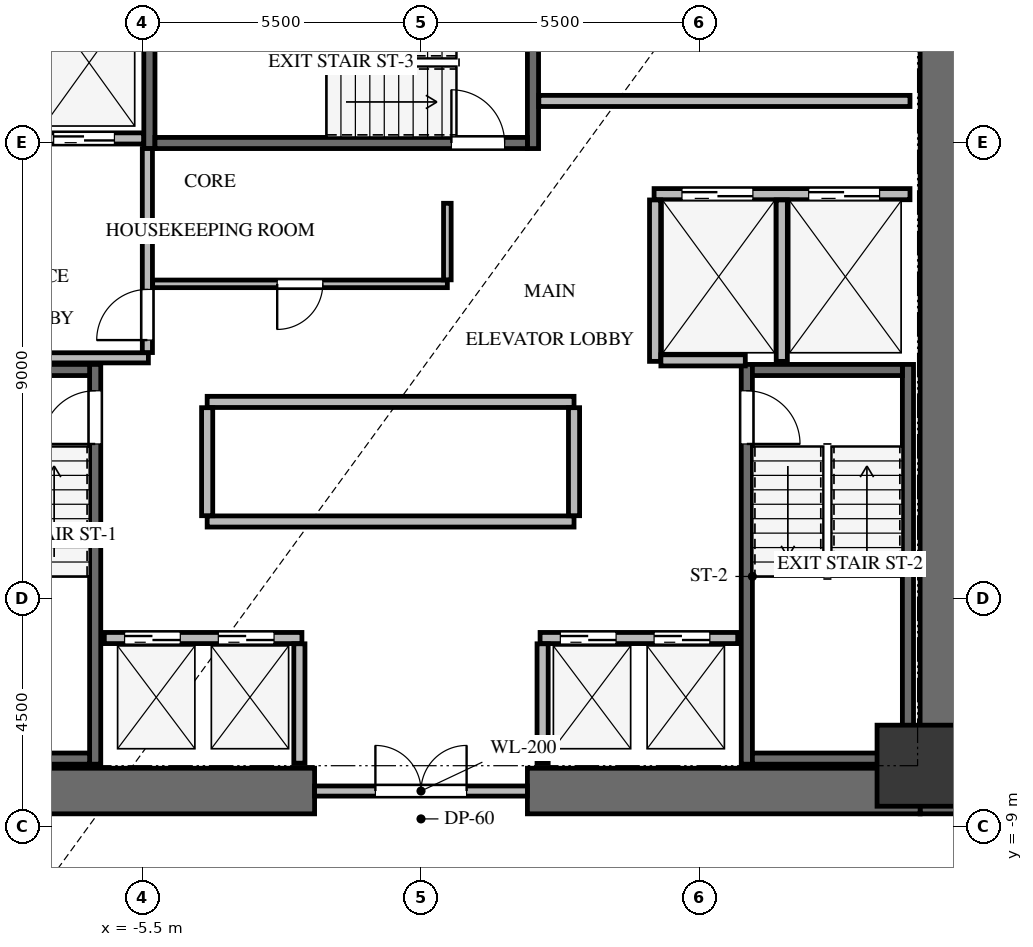
"""IFC4 building model, lengths in metres.
Left out: names, types, materials, properties, quantities, classifications, styles, units other than length and angle.
Written with IfcOpenShell. Run it as: python <this file> out.ifc"""

import sys

from ifc_helpers import new_model, si_unit, direction, frame, frame_2d, origin, origin_2d, place, context, subcontext, project, spatial, rectangle, extrude, source, transform, mapped, element, fill, save


model = new_model("IFC4")
c1 = context("Model", 3, precision=1e-05, world=origin(), true_north=direction((0.0, 1.0)))
c2 = subcontext(c1, "Body", "Model", "MODEL_VIEW")
j1 = project(units=[si_unit("LENGTHUNIT", "METRE"), si_unit("PLANEANGLEUNIT", "RADIAN")], contexts=[c1])
p1 = place(None, origin())
s1 = spatial("IfcSite", under=j1, at=p1, CompositionType="ELEMENT")
p2 = place(p1, origin())
s2 = spatial("IfcBuilding", under=s1, at=p2, CompositionType="ELEMENT")
p3 = place(p2, frame((0.0, 0.0, 32.4)))
s3 = spatial("IfcBuildingStorey", under=s2, at=p3, CompositionType="ELEMENT", Elevation=32.4)
p4 = place(p3, frame((10.3, -8.75, 0.0), z_axis=(0.0, 0.0, 1.0), x_axis=(0.0, 1.0, 0.0)))
e1 = element("IfcWall", 1, at=p4, inside=s3, PredefinedType="SHEAR", context=c2, shape_type="SweptSolid", body=[
    extrude(rectangle(XDim=17.5, YDim=0.9, at=frame_2d((8.75, 0.0))), origin(), (0.0, 0.0, 1.0), 3.3),
])
for number, where, z_axis, x_axis in (
    (2, (-9.85, -8.3, 0.0), (0.0, 0.0, 1.0), (1.0, 0.0, 0.0)),
    (3, (2.1, -8.3, 0.0), (0.0, 0.0, 1.0), (1.0, 0.0, 0.0)),
):
    element("IfcWall", number, at=place(p3, frame(where, z_axis=z_axis, x_axis=x_axis)), inside=s3, PredefinedType="SHEAR", context=c2, shape_type="SweptSolid", body=[
        extrude(rectangle(XDim=7.75, YDim=0.9, at=frame_2d((3.875, 0.0))), origin(), (0.0, 0.0, 1.0), 3.3),
    ])
p5 = place(p3, frame((-6.43, -7.77, -0.24), z_axis=(0.0, 0.0, 1.0), x_axis=(0.0, 1.0, 0.0)))
e4 = element("IfcWall", 4, at=p5, inside=s3, PredefinedType="SHEAR", context=c2, shape_type="SweptSolid", body=[
    extrude(rectangle(XDim=7.89, YDim=0.22, at=frame_2d((3.945, 0.0))), origin(), (0.0, 0.0, 1.0), 3.3),
])
p6 = place(p5, frame((6.32, 0.0, 0.0)))
e5 = element("IfcOpeningElement", 5, at=p6, cuts=e4, PredefinedType="OPENING", context=c2, shape_type="SweptSolid", body=[
    extrude(rectangle(XDim=1.05, YDim=2.15, at=frame_2d((0.525, 1.075))), frame((0.0, 0.12, 0.0), z_axis=(0.0, -1.0, 0.0), x_axis=(1.0, 0.0, 0.0)), (0.0, 0.0, 1.0), 0.24),
])
for number, where, z_axis, x_axis in (
    (6, (-9.5, -7.66, -0.24), (0.0, 0.0, 1.0), (1.0, 0.0, 0.0)),
    (7, (-6.54, 0.01, -0.24), (0.0, 0.0, 1.0), (-1.0, 0.0, 0.0)),
):
    element("IfcWall", number, at=place(p3, frame(where, z_axis=z_axis, x_axis=x_axis)), inside=s3, PredefinedType="SHEAR", context=c2, shape_type="SweptSolid", body=[
        extrude(rectangle(XDim=2.96, YDim=0.22, at=frame_2d((1.48, 0.0))), origin(), (0.0, 0.0, 1.0), 3.3),
    ])
p7 = place(p3, frame((9.61, -7.77, -0.24), z_axis=(0.0, 0.0, 1.0), x_axis=(0.0, 1.0, 0.0)))
e8 = element("IfcWall", 8, at=p7, inside=s3, PredefinedType="SHEAR", context=c2, shape_type="SweptSolid", body=[
    extrude(rectangle(XDim=7.89, YDim=0.22, at=frame_2d((3.945, 0.0))), origin(), (0.0, 0.0, 1.0), 3.3),
])
p8 = place(p3, frame((6.43, 0.12, -0.24), z_axis=(0.0, 0.0, 1.0), x_axis=(0.0, -1.0, 0.0)))
e9 = element("IfcWall", 9, at=p8, inside=s3, PredefinedType="SHEAR", context=c2, shape_type="SweptSolid", body=[
    extrude(rectangle(XDim=7.89, YDim=0.22, at=frame_2d((3.945, 0.0))), origin(), (0.0, 0.0, 1.0), 3.3),
])
p9 = place(p8, frame((0.52, 0.0, 0.0)))
e10 = element("IfcOpeningElement", 10, at=p9, cuts=e9, PredefinedType="OPENING", context=c2, shape_type="SweptSolid", body=[
    extrude(rectangle(XDim=1.05, YDim=2.15, at=frame_2d((0.525, 1.075))), frame((0.0, 0.12, 0.0), z_axis=(0.0, -1.0, 0.0), x_axis=(1.0, 0.0, 0.0)), (0.0, 0.0, 1.0), 0.24),
])
for number, where, z_axis, x_axis in (
    (11, (6.54, -7.66, -0.24), (0.0, 0.0, 1.0), (1.0, 0.0, 0.0)),
    (12, (9.5, 0.01, -0.24), (0.0, 0.0, 1.0), (-1.0, 0.0, 0.0)),
):
    element("IfcWall", number, at=place(p3, frame(where, z_axis=z_axis, x_axis=x_axis)), inside=s3, PredefinedType="SHEAR", context=c2, shape_type="SweptSolid", body=[
        extrude(rectangle(XDim=2.96, YDim=0.22, at=frame_2d((1.48, 0.0))), origin(), (0.0, 0.0, 1.0), 3.3),
    ])
for number, where, z_axis, x_axis in (
    (13, (2.21, 4.38, -0.24), (0.0, 0.0, 1.0), (0.0, 1.0, 0.0)),
    (14, (-5.36, 7.78, -0.24), (0.0, 0.0, 1.0), (0.0, -1.0, 0.0)),
):
    element("IfcWall", number, at=place(p3, frame(where, z_axis=z_axis, x_axis=x_axis)), inside=s3, PredefinedType="SHEAR", context=c2, shape_type="SweptSolid", body=[
        extrude(rectangle(XDim=3.4, YDim=0.22, at=frame_2d((1.7, 0.0))), origin(), (0.0, 0.0, 1.0), 3.3),
    ])
p10 = place(p3, frame((-5.25, 4.49, -0.24), z_axis=(0.0, 0.0, 1.0), x_axis=(1.0, 0.0, 0.0)))
e15 = element("IfcWall", 15, at=p10, inside=s3, PredefinedType="SHEAR", context=c2, shape_type="SweptSolid", body=[
    extrude(rectangle(XDim=7.35, YDim=0.22, at=frame_2d((3.675, 0.0))), origin(), (0.0, 0.0, 1.0), 3.3),
])
p11 = place(p10, frame((5.85, 0.0, 0.0)))
e16 = element("IfcOpeningElement", 16, at=p11, cuts=e15, PredefinedType="OPENING", context=c2, shape_type="SweptSolid", body=[
    extrude(rectangle(XDim=1.05, YDim=2.15, at=frame_2d((0.525, 1.075))), frame((0.0, 0.12, 0.0), z_axis=(0.0, -1.0, 0.0), x_axis=(1.0, 0.0, 0.0)), (0.0, 0.0, 1.0), 0.24),
])
m1 = source(origin(), c2, "Body", "SweptSolid", [
    extrude(rectangle(XDim=1.6, YDim=1.6, at=origin_2d()), origin(), (0.0, 0.0, 1.0), 3.3),
])
p12 = place(p3, frame((9.8, -7.8, -0.24), z_axis=(0.0, 0.0, 1.0), x_axis=(1.0, 0.0, 0.0)))
e17 = element("IfcColumn", 17, at=p12, inside=s3, PredefinedType="COLUMN", context=c2, shape_type="MappedRepresentation", body=[
    mapped(m1, transform((0.0, 0.0, 0.0), x_axis=(1.0, 0.0, 0.0), y_axis=(0.0, 1.0, 0.0), z_axis=(0.0, 0.0, 1.0), scale=1.0)),
])
p13 = place(p3, frame((-2.1, -8.3, 0.0), z_axis=(0.0, 0.0, 1.0), x_axis=(1.0, 0.0, 0.0)))
e18 = element("IfcWall", 18, at=p13, inside=s3, PredefinedType="SOLIDWALL", context=c2, shape_type="SweptSolid", body=[
    extrude(rectangle(XDim=4.2, YDim=0.2, at=frame_2d((2.1, 0.0))), origin(), (0.0, 0.0, 1.0), 3.045),
])
p14 = place(p13, frame((1.2, 0.0, 0.0)))
e19 = element("IfcOpeningElement", 19, at=p14, cuts=e18, PredefinedType="OPENING", context=c2, shape_type="SweptSolid", body=[
    extrude(rectangle(XDim=1.8, YDim=2.15, at=frame_2d((0.9, 1.075))), frame((0.0, 0.11, 0.0), z_axis=(0.0, -1.0, 0.0), x_axis=(1.0, 0.0, 0.0)), (0.0, 0.0, 1.0), 0.22),
])
p15 = place(p3, frame((-9.65, 4.58, 0.0), z_axis=(0.0, 0.0, 1.0), x_axis=(1.0, 0.0, 0.0)))
e20 = element("IfcWall", 20, at=p15, inside=s3, PredefinedType="SOLIDWALL", context=c2, shape_type="SweptSolid", body=[
    extrude(rectangle(XDim=4.175, YDim=0.22, at=frame_2d((2.087, 0.0))), origin(), (0.0, 0.0, 1.0), 3.045),
])
p16 = place(p15, frame((0.4, 0.0, 0.0)))
e21 = element("IfcOpeningElement", 21, at=p16, cuts=e20, PredefinedType="OPENING", context=c2, shape_type="SweptSolid", body=[
    extrude(rectangle(XDim=1.2, YDim=2.15, at=frame_2d((0.6, 1.075))), frame((0.0, 0.12, 0.0), z_axis=(0.0, -1.0, 0.0), x_axis=(1.0, 0.0, 0.0)), (0.0, 0.0, 1.0), 0.24),
])
p17 = place(p15, frame((2.4, 0.0, 0.0)))
e22 = element("IfcOpeningElement", 22, at=p17, cuts=e20, PredefinedType="OPENING", context=c2, shape_type="SweptSolid", body=[
    extrude(rectangle(XDim=1.2, YDim=2.15, at=frame_2d((0.6, 1.075))), frame((0.0, 0.12, 0.0), z_axis=(0.0, -1.0, 0.0), x_axis=(1.0, 0.0, 0.0)), (0.0, 0.0, 1.0), 0.24),
])
p18 = place(p3, frame((-9.65, 0.25, 0.0), z_axis=(0.0, 0.0, 1.0), x_axis=(1.0, 0.0, 0.0)))
e23 = element("IfcWall", 23, at=p18, inside=s3, PredefinedType="SOLIDWALL", context=c2, shape_type="SweptSolid", body=[
    extrude(rectangle(XDim=4.27, YDim=0.2, at=frame_2d((2.135, 0.0))), origin(), (0.0, 0.0, 1.0), 3.045),
])
p19 = place(p3, frame((-5.4, 0.354, 0.0), z_axis=(0.0, 0.0, 1.0), x_axis=(0.0, 1.0, 0.0)))
e24 = element("IfcWall", 24, at=p19, inside=s3, PredefinedType="SOLIDWALL", context=c2, shape_type="SweptSolid", body=[
    extrude(rectangle(XDim=4.026, YDim=0.2, at=frame_2d((2.013, 0.0))), origin(), (0.0, 0.0, 1.0), 3.045),
])
p20 = place(p19, frame((0.246, 0.0, 0.0)))
e25 = element("IfcOpeningElement", 25, at=p20, cuts=e24, PredefinedType="OPENING", context=c2, shape_type="SweptSolid", body=[
    extrude(rectangle(XDim=1.0, YDim=2.15, at=frame_2d((0.5, 1.075))), frame((0.0, 0.11, 0.0), z_axis=(0.0, -1.0, 0.0), x_axis=(1.0, 0.0, 0.0)), (0.0, 0.0, 1.0), 0.22),
])
p21 = place(p3, frame((4.6, 3.48, 0.0), z_axis=(0.0, 0.0, 1.0), x_axis=(1.0, 0.0, 0.0)))
e26 = element("IfcWall", 26, at=p21, inside=s3, PredefinedType="SOLIDWALL", context=c2, shape_type="SweptSolid", body=[
    extrude(rectangle(XDim=5.05, YDim=0.22, at=frame_2d((2.525, 0.0))), origin(), (0.0, 0.0, 1.0), 3.045),
])
p22 = place(p21, frame((0.55, 0.0, 0.0)))
e27 = element("IfcOpeningElement", 27, at=p22, cuts=e26, PredefinedType="OPENING", context=c2, shape_type="SweptSolid", body=[
    extrude(rectangle(XDim=1.4, YDim=2.15, at=frame_2d((0.7, 1.075))), frame((0.0, 0.12, 0.0), z_axis=(0.0, -1.0, 0.0), x_axis=(1.0, 0.0, 0.0)), (0.0, 0.0, 1.0), 0.24),
])
p23 = place(p21, frame((3.05, 0.0, 0.0)))
e28 = element("IfcOpeningElement", 28, at=p23, cuts=e26, PredefinedType="OPENING", context=c2, shape_type="SweptSolid", body=[
    extrude(rectangle(XDim=1.4, YDim=2.15, at=frame_2d((0.7, 1.075))), frame((0.0, 0.12, 0.0), z_axis=(0.0, -1.0, 0.0), x_axis=(1.0, 0.0, 0.0)), (0.0, 0.0, 1.0), 0.24),
])
for number, where, z_axis, x_axis in (
    (29, (4.62, 0.18, 0.0), (0.0, 0.0, 1.0), (0.0, 1.0, 0.0)),
    (30, (7.12, 0.18, 0.0), (0.0, 0.0, 1.0), (0.0, 1.0, 0.0)),
):
    element("IfcWall", number, at=place(p3, frame(where, z_axis=z_axis, x_axis=x_axis)), inside=s3, PredefinedType="SOLIDWALL", context=c2, shape_type="SweptSolid", body=[
        extrude(rectangle(XDim=3.186, YDim=0.22, at=frame_2d((1.593, 0.0))), origin(), (0.0, 0.0, 1.0), 3.045),
    ])
p24 = place(p3, frame((4.734, 0.2, 0.0), z_axis=(0.0, 0.0, 1.0), x_axis=(1.0, 0.0, 0.0)))
e31 = element("IfcWall", 31, at=p24, inside=s3, PredefinedType="SOLIDWALL", context=c2, shape_type="SweptSolid", body=[
    extrude(rectangle(XDim=1.666, YDim=0.22, at=frame_2d((0.833, 0.0))), origin(), (0.0, 0.0, 1.0), 3.045),
])
p25 = place(p3, frame((-6.25, -5.28, 0.0), z_axis=(0.0, 0.0, 1.0), x_axis=(1.0, 0.0, 0.0)))
e32 = element("IfcWall", 32, at=p25, inside=s3, PredefinedType="SOLIDWALL", context=c2, shape_type="SweptSolid", body=[
    extrude(rectangle(XDim=3.9, YDim=0.22, at=frame_2d((1.95, 0.0))), origin(), (0.0, 0.0, 1.0), 3.045),
])
p26 = place(p25, frame((0.4, 0.0, 0.0)))
e33 = element("IfcOpeningElement", 33, at=p26, cuts=e32, PredefinedType="OPENING", context=c2, shape_type="SweptSolid", body=[
    extrude(rectangle(XDim=1.1, YDim=2.15, at=frame_2d((0.55, 1.075))), frame((0.0, 0.12, 0.0), z_axis=(0.0, -1.0, 0.0), x_axis=(1.0, 0.0, 0.0)), (0.0, 0.0, 1.0), 0.24),
])
p27 = place(p25, frame((2.25, 0.0, 0.0)))
e34 = element("IfcOpeningElement", 34, at=p27, cuts=e32, PredefinedType="OPENING", context=c2, shape_type="SweptSolid", body=[
    extrude(rectangle(XDim=1.1, YDim=2.15, at=frame_2d((0.55, 1.075))), frame((0.0, 0.12, 0.0), z_axis=(0.0, -1.0, 0.0), x_axis=(1.0, 0.0, 0.0)), (0.0, 0.0, 1.0), 0.24),
])
p28 = place(p3, frame((2.35, -5.28, 0.0), z_axis=(0.0, 0.0, 1.0), x_axis=(1.0, 0.0, 0.0)))
e35 = element("IfcWall", 35, at=p28, inside=s3, PredefinedType="SOLIDWALL", context=c2, shape_type="SweptSolid", body=[
    extrude(rectangle(XDim=3.9, YDim=0.22, at=frame_2d((1.95, 0.0))), origin(), (0.0, 0.0, 1.0), 3.045),
])
p29 = place(p28, frame((0.4, 0.0, 0.0)))
e36 = element("IfcOpeningElement", 36, at=p29, cuts=e35, PredefinedType="OPENING", context=c2, shape_type="SweptSolid", body=[
    extrude(rectangle(XDim=1.1, YDim=2.15, at=frame_2d((0.55, 1.075))), frame((0.0, 0.12, 0.0), z_axis=(0.0, -1.0, 0.0), x_axis=(1.0, 0.0, 0.0)), (0.0, 0.0, 1.0), 0.24),
])
p30 = place(p28, frame((2.25, 0.0, 0.0)))
e37 = element("IfcOpeningElement", 37, at=p30, cuts=e35, PredefinedType="OPENING", context=c2, shape_type="SweptSolid", body=[
    extrude(rectangle(XDim=1.1, YDim=2.15, at=frame_2d((0.55, 1.075))), frame((0.0, 0.12, 0.0), z_axis=(0.0, -1.0, 0.0), x_axis=(1.0, 0.0, 0.0)), (0.0, 0.0, 1.0), 0.24),
])
for number, where, z_axis, x_axis in (
    (38, (-2.4, -7.75, 0.0), (0.0, 0.0, 1.0), (0.0, 1.0, 0.0)),
    (39, (2.4, -7.75, 0.0), (0.0, 0.0, 1.0), (0.0, 1.0, 0.0)),
):
    element("IfcWall", number, at=place(p3, frame(where, z_axis=z_axis, x_axis=x_axis)), inside=s3, PredefinedType="SOLIDWALL", context=c2, shape_type="SweptSolid", body=[
        extrude(rectangle(XDim=2.356, YDim=0.22, at=frame_2d((1.178, 0.0))), origin(), (0.0, 0.0, 1.0), 3.045),
    ])
for number, where, z_axis, x_axis in (
    (40, (-4.22, -2.98, 0.0), (0.0, 0.0, 1.0), (1.0, 0.0, 0.0)),
    (41, (-4.22, -0.62, 0.0), (0.0, 0.0, 1.0), (1.0, 0.0, 0.0)),
):
    element("IfcWall", number, at=place(p3, frame(where, z_axis=z_axis, x_axis=x_axis)), inside=s3, PredefinedType="SOLIDWALL", context=c2, shape_type="SweptSolid", body=[
        extrude(rectangle(XDim=7.24, YDim=0.22, at=frame_2d((3.62, 0.0))), origin(), (0.0, 0.0, 1.0), 3.045),
    ])
for number, where, z_axis, x_axis in (
    (42, (-4.22, -2.866, 0.0), (0.0, 0.0, 1.0), (0.0, 1.0, 0.0)),
    (43, (3.02, -2.866, 0.0), (0.0, 0.0, 1.0), (0.0, 1.0, 0.0)),
):
    element("IfcWall", number, at=place(p3, frame(where, z_axis=z_axis, x_axis=x_axis)), inside=s3, PredefinedType="SOLIDWALL", context=c2, shape_type="SweptSolid", body=[
        extrude(rectangle(XDim=2.132, YDim=0.22, at=frame_2d((1.066, 0.0))), origin(), (0.0, 0.0, 1.0), 3.045),
    ])
p31 = place(p3, frame((2.325, 5.32, 0.0), z_axis=(0.0, 0.0, 1.0), x_axis=(1.0, 0.0, 0.0)))
e44 = element("IfcWall", 44, at=p31, inside=s3, PredefinedType="SOLIDWALL", context=c2, shape_type="SweptSolid", body=[
    extrude(rectangle(XDim=7.325, YDim=0.22, at=frame_2d((3.663, 0.0))), origin(), (0.0, 0.0, 1.0), 3.045),
])
p32 = place(p3, frame((0.52, 1.71, 0.0), z_axis=(0.0, 0.0, 1.0), x_axis=(-1.0, 0.0, 0.0)))
e45 = element("IfcWall", 45, at=p32, inside=s3, PredefinedType="PARTITIONING", context=c2, shape_type="SweptSolid", body=[
    extrude(rectangle(XDim=5.816, YDim=0.15, at=frame_2d((2.908, 0.0))), origin(), (0.0, 0.0, 1.0), 3.045),
])
p33 = place(p32, frame((2.458, 0.0, 0.0)))
e46 = element("IfcOpeningElement", 46, at=p33, cuts=e45, PredefinedType="OPENING", context=c2, shape_type="SweptSolid", body=[
    extrude(rectangle(XDim=0.9, YDim=2.05, at=frame_2d((0.45, 1.025))), frame((0.0, 0.085, 0.0), z_axis=(0.0, -1.0, 0.0), x_axis=(1.0, 0.0, 0.0)), (0.0, 0.0, 1.0), 0.17),
])
p34 = place(p3, frame((0.52, 3.3, 0.0), z_axis=(0.0, 0.0, 1.0), x_axis=(0.0, -1.0, 0.0)))
e47 = element("IfcWall", 47, at=p34, inside=s3, PredefinedType="PARTITIONING", context=c2, shape_type="SweptSolid", body=[
    extrude(rectangle(XDim=1.511, YDim=0.15, at=frame_2d((0.755, 0.0))), origin(), (0.0, 0.0, 1.0), 3.045),
])
m2 = source(origin(), c2, "Body", "SweptSolid", [
    extrude(rectangle(XDim=1.05, YDim=2.15, at=frame_2d((0.525, 1.075))), frame((0.0, 0.025, 0.0), z_axis=(0.0, -1.0, 0.0), x_axis=(1.0, 0.0, 0.0)), (0.0, 0.0, 1.0), 0.05),
])
p35 = place(p6, origin())
e48 = element("IfcDoor", 48, at=p35, inside=s3, OperationType="SINGLE_SWING_LEFT", PredefinedType="DOOR", context=c2, shape_type="MappedRepresentation", body=[
    mapped(m2, transform((0.0, 0.0, 0.0), x_axis=(1.0, 0.0, 0.0), y_axis=(0.0, 1.0, 0.0), z_axis=(0.0, 0.0, 1.0), scale=1.0)),
])
fill(e5, e48)
m3 = source(origin(), c2, "Body", "SweptSolid", [
    extrude(rectangle(XDim=1.05, YDim=2.15, at=frame_2d((0.525, 1.075))), frame((0.0, 0.025, 0.0), z_axis=(0.0, -1.0, 0.0), x_axis=(1.0, 0.0, 0.0)), (0.0, 0.0, 1.0), 0.05),
])
p36 = place(p9, origin())
e49 = element("IfcDoor", 49, at=p36, inside=s3, OperationType="SINGLE_SWING_RIGHT", PredefinedType="DOOR", context=c2, shape_type="MappedRepresentation", body=[
    mapped(m3, transform((0.0, 0.0, 0.0), x_axis=(1.0, 0.0, 0.0), y_axis=(0.0, 1.0, 0.0), z_axis=(0.0, 0.0, 1.0), scale=1.0)),
])
fill(e10, e49)
p37 = place(p11, origin())
e50 = element("IfcDoor", 50, at=p37, inside=s3, OperationType="SINGLE_SWING_LEFT", PredefinedType="DOOR", context=c2, shape_type="MappedRepresentation", body=[
    mapped(m2, transform((0.0, 0.0, 0.0), x_axis=(1.0, 0.0, 0.0), y_axis=(0.0, 1.0, 0.0), z_axis=(0.0, 0.0, 1.0), scale=1.0)),
])
fill(e16, e50)
m4 = source(origin(), c2, "Body", "SweptSolid", [
    extrude(rectangle(XDim=1.8, YDim=2.15, at=frame_2d((0.9, 1.075))), frame((0.0, 0.025, 0.0), z_axis=(0.0, -1.0, 0.0), x_axis=(1.0, 0.0, 0.0)), (0.0, 0.0, 1.0), 0.05),
])
p38 = place(p14, origin())
e51 = element("IfcDoor", 51, at=p38, inside=s3, OperationType="DOUBLE_DOOR_SINGLE_SWING", PredefinedType="DOOR", context=c2, shape_type="MappedRepresentation", body=[
    mapped(m4, transform((0.0, 0.0, 0.0), x_axis=(1.0, 0.0, 0.0), y_axis=(0.0, 1.0, 0.0), z_axis=(0.0, 0.0, 1.0), scale=1.0)),
])
fill(e19, e51)
m5 = source(origin(), c2, "Body", "SweptSolid", [
    extrude(rectangle(XDim=1.2, YDim=2.15, at=frame_2d((0.6, 1.075))), frame((0.0, 0.025, 0.0), z_axis=(0.0, -1.0, 0.0), x_axis=(1.0, 0.0, 0.0)), (0.0, 0.0, 1.0), 0.05),
])
p39 = place(p17, origin())
e52 = element("IfcDoor", 52, at=p39, inside=s3, OperationType="DOUBLE_DOOR_SLIDING", PredefinedType="DOOR", context=c2, shape_type="MappedRepresentation", body=[
    mapped(m5, transform((0.0, 0.0, 0.0), x_axis=(1.0, 0.0, 0.0), y_axis=(0.0, 1.0, 0.0), z_axis=(0.0, 0.0, 1.0), scale=1.0)),
])
fill(e22, e52)
m6 = source(origin(), c2, "Body", "SweptSolid", [
    extrude(rectangle(XDim=1.0, YDim=2.15, at=frame_2d((0.5, 1.075))), frame((0.0, 0.025, 0.0), z_axis=(0.0, -1.0, 0.0), x_axis=(1.0, 0.0, 0.0)), (0.0, 0.0, 1.0), 0.05),
])
p40 = place(p20, origin())
e53 = element("IfcDoor", 53, at=p40, inside=s3, OperationType="SINGLE_SWING_LEFT", PredefinedType="DOOR", context=c2, shape_type="MappedRepresentation", body=[
    mapped(m6, transform((0.0, 0.0, 0.0), x_axis=(1.0, 0.0, 0.0), y_axis=(0.0, 1.0, 0.0), z_axis=(0.0, 0.0, 1.0), scale=1.0)),
])
fill(e25, e53)
m7 = source(origin(), c2, "Body", "SweptSolid", [
    extrude(rectangle(XDim=1.4, YDim=2.15, at=frame_2d((0.7, 1.075))), frame((0.0, 0.025, 0.0), z_axis=(0.0, -1.0, 0.0), x_axis=(1.0, 0.0, 0.0)), (0.0, 0.0, 1.0), 0.05),
])
p41 = place(p22, origin())
e54 = element("IfcDoor", 54, at=p41, inside=s3, OperationType="DOUBLE_DOOR_SLIDING", PredefinedType="DOOR", context=c2, shape_type="MappedRepresentation", body=[
    mapped(m7, transform((0.0, 0.0, 0.0), x_axis=(1.0, 0.0, 0.0), y_axis=(0.0, 1.0, 0.0), z_axis=(0.0, 0.0, 1.0), scale=1.0)),
])
fill(e27, e54)
p42 = place(p23, origin())
e55 = element("IfcDoor", 55, at=p42, inside=s3, OperationType="DOUBLE_DOOR_SLIDING", PredefinedType="DOOR", context=c2, shape_type="MappedRepresentation", body=[
    mapped(m7, transform((0.0, 0.0, 0.0), x_axis=(1.0, 0.0, 0.0), y_axis=(0.0, 1.0, 0.0), z_axis=(0.0, 0.0, 1.0), scale=1.0)),
])
fill(e28, e55)
m8 = source(origin(), c2, "Body", "SweptSolid", [
    extrude(rectangle(XDim=1.1, YDim=2.15, at=frame_2d((0.55, 1.075))), frame((0.0, 0.025, 0.0), z_axis=(0.0, -1.0, 0.0), x_axis=(1.0, 0.0, 0.0)), (0.0, 0.0, 1.0), 0.05),
])
p43 = place(p26, origin())
e56 = element("IfcDoor", 56, at=p43, inside=s3, OperationType="DOUBLE_DOOR_SLIDING", PredefinedType="DOOR", context=c2, shape_type="MappedRepresentation", body=[
    mapped(m8, transform((0.0, 0.0, 0.0), x_axis=(1.0, 0.0, 0.0), y_axis=(0.0, 1.0, 0.0), z_axis=(0.0, 0.0, 1.0), scale=1.0)),
])
fill(e33, e56)
p44 = place(p27, origin())
e57 = element("IfcDoor", 57, at=p44, inside=s3, OperationType="DOUBLE_DOOR_SLIDING", PredefinedType="DOOR", context=c2, shape_type="MappedRepresentation", body=[
    mapped(m8, transform((0.0, 0.0, 0.0), x_axis=(1.0, 0.0, 0.0), y_axis=(0.0, 1.0, 0.0), z_axis=(0.0, 0.0, 1.0), scale=1.0)),
])
fill(e34, e57)
p45 = place(p29, origin())
e58 = element("IfcDoor", 58, at=p45, inside=s3, OperationType="DOUBLE_DOOR_SLIDING", PredefinedType="DOOR", context=c2, shape_type="MappedRepresentation", body=[
    mapped(m8, transform((0.0, 0.0, 0.0), x_axis=(1.0, 0.0, 0.0), y_axis=(0.0, 1.0, 0.0), z_axis=(0.0, 0.0, 1.0), scale=1.0)),
])
fill(e36, e58)
p46 = place(p30, origin())
e59 = element("IfcDoor", 59, at=p46, inside=s3, OperationType="DOUBLE_DOOR_SLIDING", PredefinedType="DOOR", context=c2, shape_type="MappedRepresentation", body=[
    mapped(m8, transform((0.0, 0.0, 0.0), x_axis=(1.0, 0.0, 0.0), y_axis=(0.0, 1.0, 0.0), z_axis=(0.0, 0.0, 1.0), scale=1.0)),
])
fill(e37, e59)
m9 = source(origin(), c2, "Body", "SweptSolid", [
    extrude(rectangle(XDim=0.9, YDim=2.05, at=frame_2d((0.45, 1.025))), frame((0.0, 0.025, 0.0), z_axis=(0.0, -1.0, 0.0), x_axis=(1.0, 0.0, 0.0)), (0.0, 0.0, 1.0), 0.05),
])
p47 = place(p33, origin())
e60 = element("IfcDoor", 60, at=p47, inside=s3, OperationType="SINGLE_SWING_RIGHT", PredefinedType="DOOR", context=c2, shape_type="MappedRepresentation", body=[
    mapped(m9, transform((0.0, 0.0, 0.0), x_axis=(1.0, 0.0, 0.0), y_axis=(0.0, 1.0, 0.0), z_axis=(0.0, 0.0, 1.0), scale=1.0)),
])
fill(e46, e60)
save(model, sys.argv[1])
